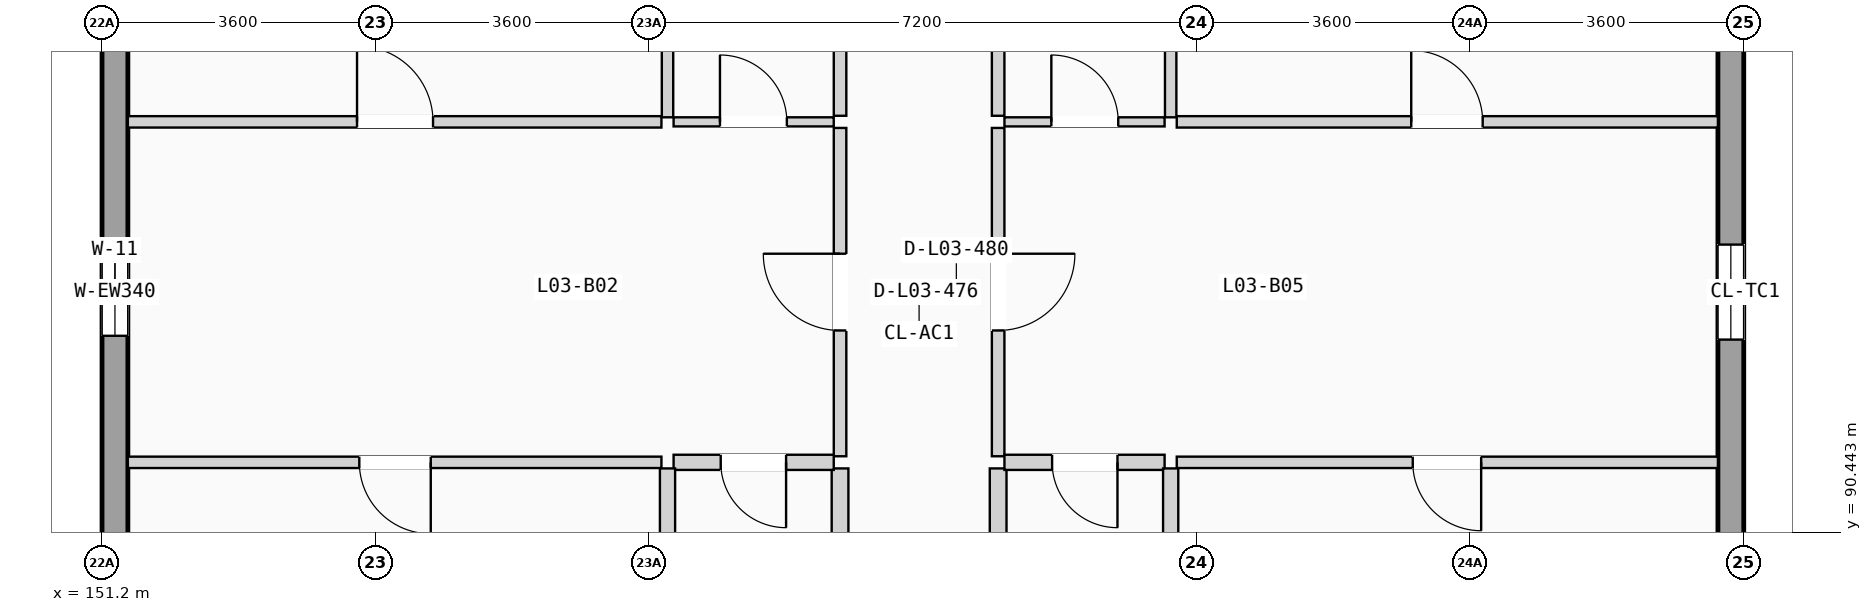
"""IFC4 building model, lengths in metres.
Left out: names, types, materials, properties, quantities, classifications, styles, units other than length and angle.
Written with IfcOpenShell. Run it as: python <this file> out.ifc"""

import sys

from ifc_helpers import new_model, si_unit, direction, frame, frame_2d, origin, place, context, subcontext, project, spatial, rectangle, extrude, element, fill, save


model = new_model("IFC4")
c1 = context("Model", 3, precision=1e-05, world=origin(), true_north=direction((0.0, 1.0)))
c2 = subcontext(c1, "Body", "Model", "MODEL_VIEW")
j1 = project(units=[si_unit("LENGTHUNIT", "METRE"), si_unit("PLANEANGLEUNIT", "RADIAN")], contexts=[c1])
p1 = place(None, origin())
s1 = spatial("IfcSite", under=j1, at=p1, CompositionType="ELEMENT")
p2 = place(p1, origin())
s2 = spatial("IfcBuilding", under=s1, at=p2, CompositionType="ELEMENT")
p3 = place(p2, frame((0.0, 0.0, 12.075)))
s3 = spatial("IfcBuildingStorey", under=s2, at=p3, CompositionType="ELEMENT", Elevation=12.075)
p4 = place(p3, frame((151.37, 68.74, 0.0), z_axis=(0.0, 0.0, 1.0), x_axis=(0.0, 1.0, 0.0)))
e1 = element("IfcWall", 1, at=p4, inside=s3, PredefinedType="SOLIDWALL", context=c2, shape_type="SweptSolid", body=[
    extrude(rectangle(XDim=49.72, YDim=0.34, at=frame_2d((24.86, 0.0))), origin(), (0.0, 0.0, 1.0), 2.89),
])
p5 = place(p4, frame((11.462, 0.0, 0.0)))
e2 = element("IfcOpeningElement", 2, at=p5, cuts=e1, PredefinedType="OPENING", context=c2, shape_type="SweptSolid", body=[
    extrude(rectangle(XDim=0.95, YDim=2.15, at=frame_2d((0.475, 1.075))), frame((0.0, 0.18, 0.0), z_axis=(0.0, -1.0, 0.0), x_axis=(1.0, 0.0, 0.0)), (0.0, 0.0, 1.0), 0.36),
])
p6 = place(p4, frame((8.481, 0.0, 0.555)))
e3 = element("IfcOpeningElement", 3, at=p6, cuts=e1, PredefinedType="OPENING", context=c2, shape_type="SweptSolid", body=[
    extrude(rectangle(XDim=1.05, YDim=1.65, at=frame_2d((0.525, 0.825))), frame((0.0, 0.18, 0.0), z_axis=(0.0, -1.0, 0.0), x_axis=(1.0, 0.0, 0.0)), (0.0, 0.0, 1.0), 0.36),
])
p7 = place(p4, frame((16.565, 0.0, 0.85)))
e4 = element("IfcOpeningElement", 4, at=p7, cuts=e1, PredefinedType="OPENING", context=c2, shape_type="SweptSolid", body=[
    extrude(rectangle(XDim=0.95, YDim=1.2, at=frame_2d((0.475, 0.6))), frame((0.0, 0.18, 0.0), z_axis=(0.0, -1.0, 0.0), x_axis=(1.0, 0.0, 0.0)), (0.0, 0.0, 1.0), 0.36),
])
p8 = place(p4, frame((24.285, 0.0, 0.9)))
e5 = element("IfcOpeningElement", 5, at=p8, cuts=e1, PredefinedType="OPENING", context=c2, shape_type="SweptSolid", body=[
    extrude(rectangle(XDim=1.15, YDim=1.2, at=frame_2d((0.575, 0.6))), frame((0.0, 0.18, 0.0), z_axis=(0.0, -1.0, 0.0), x_axis=(1.0, 0.0, 0.0)), (0.0, 0.0, 1.0), 0.36),
])
p9 = place(p4, frame((19.403, 0.0, 0.855)))
e6 = element("IfcOpeningElement", 6, at=p9, cuts=e1, PredefinedType="OPENING", context=c2, shape_type="SweptSolid", body=[
    extrude(rectangle(XDim=1.15, YDim=1.35, at=frame_2d((0.575, 0.675))), frame((0.0, 0.18, 0.0), z_axis=(0.0, -1.0, 0.0), x_axis=(1.0, 0.0, 0.0)), (0.0, 0.0, 1.0), 0.36),
])
p10 = place(p4, frame((29.167, 0.0, 0.705)))
e7 = element("IfcOpeningElement", 7, at=p10, cuts=e1, PredefinedType="OPENING", context=c2, shape_type="SweptSolid", body=[
    extrude(rectangle(XDim=1.15, YDim=1.5, at=frame_2d((0.575, 0.75))), frame((0.0, 0.18, 0.0), z_axis=(0.0, -1.0, 0.0), x_axis=(1.0, 0.0, 0.0)), (0.0, 0.0, 1.0), 0.36),
])
p11 = place(p4, frame((37.243, 0.0, 0.0)))
e8 = element("IfcOpeningElement", 8, at=p11, cuts=e1, PredefinedType="OPENING", context=c2, shape_type="SweptSolid", body=[
    extrude(rectangle(XDim=1.08, YDim=2.18, at=frame_2d((0.54, 1.09))), frame((0.0, 0.18, 0.0), z_axis=(0.0, -1.0, 0.0), x_axis=(1.0, 0.0, 0.0)), (0.0, 0.0, 1.0), 0.36),
])
p12 = place(p4, frame((32.106, 0.0, 0.555)))
e9 = element("IfcOpeningElement", 9, at=p12, cuts=e1, PredefinedType="OPENING", context=c2, shape_type="SweptSolid", body=[
    extrude(rectangle(XDim=1.15, YDim=1.65, at=frame_2d((0.575, 0.825))), frame((0.0, 0.18, 0.0), z_axis=(0.0, -1.0, 0.0), x_axis=(1.0, 0.0, 0.0)), (0.0, 0.0, 1.0), 0.36),
])
p13 = place(p4, frame((40.239, 0.0, 0.85)))
e10 = element("IfcOpeningElement", 10, at=p13, cuts=e1, PredefinedType="OPENING", context=c2, shape_type="SweptSolid", body=[
    extrude(rectangle(XDim=0.95, YDim=1.2, at=frame_2d((0.475, 0.6))), frame((0.0, 0.18, 0.0), z_axis=(0.0, -1.0, 0.0), x_axis=(1.0, 0.0, 0.0)), (0.0, 0.0, 1.0), 0.36),
])
p14 = place(p3, frame((172.63, 68.74, 0.0), z_axis=(0.0, 0.0, 1.0), x_axis=(0.0, 1.0, 0.0)))
e11 = element("IfcWall", 11, at=p14, inside=s3, PredefinedType="SOLIDWALL", context=c2, shape_type="SweptSolid", body=[
    extrude(rectangle(XDim=49.72, YDim=0.34, at=frame_2d((24.86, 0.0))), origin(), (0.0, 0.0, 1.0), 2.89),
])
p15 = place(p14, frame((9.472, 0.0, 0.9)))
e12 = element("IfcOpeningElement", 12, at=p15, cuts=e11, PredefinedType="OPENING", context=c2, shape_type="SweptSolid", body=[
    extrude(rectangle(XDim=1.25, YDim=1.2, at=frame_2d((0.625, 0.6))), frame((0.0, 0.18, 0.0), z_axis=(0.0, -1.0, 0.0), x_axis=(1.0, 0.0, 0.0)), (0.0, 0.0, 1.0), 0.36),
])
p16 = place(p14, frame((15.933, 0.0, 0.855)))
e13 = element("IfcOpeningElement", 13, at=p16, cuts=e11, PredefinedType="OPENING", context=c2, shape_type="SweptSolid", body=[
    extrude(rectangle(XDim=1.25, YDim=1.35, at=frame_2d((0.625, 0.675))), frame((0.0, 0.18, 0.0), z_axis=(0.0, -1.0, 0.0), x_axis=(1.0, 0.0, 0.0)), (0.0, 0.0, 1.0), 0.36),
])
p17 = place(p14, frame((24.235, 0.0, 0.705)))
e14 = element("IfcOpeningElement", 14, at=p17, cuts=e11, PredefinedType="OPENING", context=c2, shape_type="SweptSolid", body=[
    extrude(rectangle(XDim=1.25, YDim=1.5, at=frame_2d((0.625, 0.75))), frame((0.0, 0.18, 0.0), z_axis=(0.0, -1.0, 0.0), x_axis=(1.0, 0.0, 0.0)), (0.0, 0.0, 1.0), 0.36),
])
p18 = place(p14, frame((19.353, 0.0, 0.555)))
e15 = element("IfcOpeningElement", 15, at=p18, cuts=e11, PredefinedType="OPENING", context=c2, shape_type="SweptSolid", body=[
    extrude(rectangle(XDim=1.25, YDim=1.65, at=frame_2d((0.625, 0.825))), frame((0.0, 0.18, 0.0), z_axis=(0.0, -1.0, 0.0), x_axis=(1.0, 0.0, 0.0)), (0.0, 0.0, 1.0), 0.36),
])
p19 = place(p14, frame((29.267, 0.0, 0.85)))
e16 = element("IfcOpeningElement", 16, at=p19, cuts=e11, PredefinedType="OPENING", context=c2, shape_type="SweptSolid", body=[
    extrude(rectangle(XDim=0.95, YDim=1.2, at=frame_2d((0.475, 0.6))), frame((0.0, 0.18, 0.0), z_axis=(0.0, -1.0, 0.0), x_axis=(1.0, 0.0, 0.0)), (0.0, 0.0, 1.0), 0.36),
])
p20 = place(p14, frame((36.694, 0.0, 0.9)))
e17 = element("IfcOpeningElement", 17, at=p20, cuts=e11, PredefinedType="OPENING", context=c2, shape_type="SweptSolid", body=[
    extrude(rectangle(XDim=1.35, YDim=1.2, at=frame_2d((0.675, 0.6))), frame((0.0, 0.18, 0.0), z_axis=(0.0, -1.0, 0.0), x_axis=(1.0, 0.0, 0.0)), (0.0, 0.0, 1.0), 0.36),
])
p21 = place(p14, frame((32.006, 0.0, 0.855)))
e18 = element("IfcOpeningElement", 18, at=p21, cuts=e11, PredefinedType="OPENING", context=c2, shape_type="SweptSolid", body=[
    extrude(rectangle(XDim=1.35, YDim=1.35, at=frame_2d((0.675, 0.675))), frame((0.0, 0.18, 0.0), z_axis=(0.0, -1.0, 0.0), x_axis=(1.0, 0.0, 0.0)), (0.0, 0.0, 1.0), 0.36),
])
p22 = place(p14, frame((40.038, 0.0, 0.705)))
e19 = element("IfcOpeningElement", 19, at=p22, cuts=e11, PredefinedType="OPENING", context=c2, shape_type="SweptSolid", body=[
    extrude(rectangle(XDim=1.35, YDim=1.5, at=frame_2d((0.675, 0.75))), frame((0.0, 0.18, 0.0), z_axis=(0.0, -1.0, 0.0), x_axis=(1.0, 0.0, 0.0)), (0.0, 0.0, 1.0), 0.36),
])
p23 = place(p3, frame((160.91, 91.44, 0.0), z_axis=(0.0, 0.0, 1.0), x_axis=(0.0, 1.0, 0.0)))
e20 = element("IfcWall", 20, at=p23, inside=s3, PredefinedType="PARTITIONING", context=c2, shape_type="SweptSolid", body=[
    extrude(rectangle(XDim=4.32, YDim=0.165, at=frame_2d((2.16, 0.0))), origin(), (0.0, 0.0, 1.0), 2.87),
])
p24 = place(p23, frame((1.655, 0.0, 0.0)))
e21 = element("IfcOpeningElement", 21, at=p24, cuts=e20, PredefinedType="OPENING", context=c2, shape_type="SweptSolid", body=[
    extrude(rectangle(XDim=1.01, YDim=2.11, at=frame_2d((0.505, 1.055))), frame((0.0, 0.093, 0.0), z_axis=(0.0, -1.0, 0.0), x_axis=(1.0, 0.0, 0.0)), (0.0, 0.0, 1.0), 0.185),
])
p25 = place(p3, frame((160.91, 87.706, 0.0), z_axis=(0.0, 0.0, 1.0), x_axis=(0.0, 1.0, 0.0)))
e22 = element("IfcWall", 22, at=p25, inside=s3, PredefinedType="PLUMBINGWALL", context=c2, shape_type="SweptSolid", body=[
    extrude(rectangle(XDim=3.574, YDim=0.22, at=frame_2d((1.787, 0.0))), origin(), (0.0, 0.0, 1.0), 2.87),
])
p26 = place(p3, frame((160.91, 95.92, 0.0), z_axis=(0.0, 0.0, 1.0), x_axis=(0.0, 1.0, 0.0)))
e23 = element("IfcWall", 23, at=p26, inside=s3, PredefinedType="PARTITIONING", context=c2, shape_type="SweptSolid", body=[
    extrude(rectangle(XDim=3.574, YDim=0.165, at=frame_2d((1.787, 0.0))), origin(), (0.0, 0.0, 1.0), 2.87),
])
p27 = place(p3, frame((162.99, 91.44, 0.0), z_axis=(0.0, 0.0, 1.0), x_axis=(0.0, 1.0, 0.0)))
e24 = element("IfcWall", 24, at=p27, inside=s3, PredefinedType="PARTITIONING", context=c2, shape_type="SweptSolid", body=[
    extrude(rectangle(XDim=4.32, YDim=0.165, at=frame_2d((2.16, 0.0))), origin(), (0.0, 0.0, 1.0), 2.87),
])
p28 = place(p27, frame((1.655, 0.0, 0.0)))
e25 = element("IfcOpeningElement", 25, at=p28, cuts=e24, PredefinedType="OPENING", context=c2, shape_type="SweptSolid", body=[
    extrude(rectangle(XDim=1.01, YDim=2.11, at=frame_2d((0.505, 1.055))), frame((0.0, 0.093, 0.0), z_axis=(0.0, -1.0, 0.0), x_axis=(1.0, 0.0, 0.0)), (0.0, 0.0, 1.0), 0.185),
])
p29 = place(p3, frame((162.99, 87.706, 0.0), z_axis=(0.0, 0.0, 1.0), x_axis=(0.0, 1.0, 0.0)))
e26 = element("IfcWall", 26, at=p29, inside=s3, PredefinedType="PLUMBINGWALL", context=c2, shape_type="SweptSolid", body=[
    extrude(rectangle(XDim=3.574, YDim=0.22, at=frame_2d((1.787, 0.0))), origin(), (0.0, 0.0, 1.0), 2.87),
])
p30 = place(p3, frame((162.99, 95.92, 0.0), z_axis=(0.0, 0.0, 1.0), x_axis=(0.0, 1.0, 0.0)))
e27 = element("IfcWall", 27, at=p30, inside=s3, PredefinedType="PARTITIONING", context=c2, shape_type="SweptSolid", body=[
    extrude(rectangle(XDim=3.574, YDim=0.165, at=frame_2d((1.787, 0.0))), origin(), (0.0, 0.0, 1.0), 2.87),
])
p31 = place(p3, frame((158.72, 91.36, 0.0), z_axis=(0.0, 0.0, 1.0), x_axis=(1.0, 0.0, 0.0)))
e28 = element("IfcWall", 28, at=p31, inside=s3, PredefinedType="PLUMBINGWALL", context=c2, shape_type="SweptSolid", body=[
    extrude(rectangle(XDim=2.107, YDim=0.2, at=frame_2d((1.053, 0.0))), origin(), (0.0, 0.0, 1.0), 2.87),
])
p32 = place(p31, frame((0.62, 0.0, 0.0)))
e29 = element("IfcOpeningElement", 29, at=p32, cuts=e28, PredefinedType="OPENING", context=c2, shape_type="SweptSolid", body=[
    extrude(rectangle(XDim=0.86, YDim=2.0, at=frame_2d((0.43, 1.0))), frame((0.0, 0.11, 0.0), z_axis=(0.0, -1.0, 0.0), x_axis=(1.0, 0.0, 0.0)), (0.0, 0.0, 1.0), 0.22),
])
p33 = place(p3, frame((158.72, 95.84, 0.0), z_axis=(0.0, 0.0, 1.0), x_axis=(1.0, 0.0, 0.0)))
e30 = element("IfcWall", 30, at=p33, inside=s3, PredefinedType="PARTITIONING", context=c2, shape_type="SweptSolid", body=[
    extrude(rectangle(XDim=2.107, YDim=0.12, at=frame_2d((1.053, 0.0))), origin(), (0.0, 0.0, 1.0), 2.87),
])
p34 = place(p33, frame((0.61, 0.0, 0.0)))
e31 = element("IfcOpeningElement", 31, at=p34, cuts=e30, PredefinedType="OPENING", context=c2, shape_type="SweptSolid", body=[
    extrude(rectangle(XDim=0.88, YDim=2.02, at=frame_2d((0.44, 1.01))), frame((0.0, 0.07, 0.0), z_axis=(0.0, -1.0, 0.0), x_axis=(1.0, 0.0, 0.0)), (0.0, 0.0, 1.0), 0.14),
])
p35 = place(p3, frame((151.54, 91.36, 0.0), z_axis=(0.0, 0.0, 1.0), x_axis=(1.0, 0.0, 0.0)))
e32 = element("IfcWall", 32, at=p35, inside=s3, PredefinedType="PARTITIONING", context=c2, shape_type="SweptSolid", body=[
    extrude(rectangle(XDim=7.02, YDim=0.15, at=frame_2d((3.51, 0.0))), origin(), (0.0, 0.0, 1.0), 2.87),
])
p36 = place(p35, frame((3.045, 0.0, 0.0)))
e33 = element("IfcOpeningElement", 33, at=p36, cuts=e32, PredefinedType="OPENING", context=c2, shape_type="SweptSolid", body=[
    extrude(rectangle(XDim=0.94, YDim=2.06, at=frame_2d((0.47, 1.03))), frame((0.0, 0.085, 0.0), z_axis=(0.0, -1.0, 0.0), x_axis=(1.0, 0.0, 0.0)), (0.0, 0.0, 1.0), 0.17),
])
p37 = place(p3, frame((151.54, 95.84, 0.0), z_axis=(0.0, 0.0, 1.0), x_axis=(1.0, 0.0, 0.0)))
e34 = element("IfcWall", 34, at=p37, inside=s3, PredefinedType="PARTITIONING", context=c2, shape_type="SweptSolid", body=[
    extrude(rectangle(XDim=7.02, YDim=0.15, at=frame_2d((3.51, 0.0))), origin(), (0.0, 0.0, 1.0), 2.87),
])
p38 = place(p37, frame((3.015, 0.0, 0.0)))
e35 = element("IfcOpeningElement", 35, at=p38, cuts=e34, PredefinedType="OPENING", context=c2, shape_type="SweptSolid", body=[
    extrude(rectangle(XDim=1.0, YDim=2.06, at=frame_2d((0.5, 1.03))), frame((0.0, 0.085, 0.0), z_axis=(0.0, -1.0, 0.0), x_axis=(1.0, 0.0, 0.0)), (0.0, 0.0, 1.0), 0.17),
])
p39 = place(p3, frame((158.64, 87.706, 0.0), z_axis=(0.0, 0.0, 1.0), x_axis=(0.0, 1.0, 0.0)))
e36 = element("IfcWall", 36, at=p39, inside=s3, PredefinedType="PLUMBINGWALL", context=c2, shape_type="SweptSolid", body=[
    extrude(rectangle(XDim=3.574, YDim=0.2, at=frame_2d((1.787, 0.0))), origin(), (0.0, 0.0, 1.0), 2.87),
])
p40 = place(p3, frame((158.64, 95.9, 0.0), z_axis=(0.0, 0.0, 1.0), x_axis=(0.0, 1.0, 0.0)))
e37 = element("IfcWall", 37, at=p40, inside=s3, PredefinedType="PARTITIONING", context=c2, shape_type="SweptSolid", body=[
    extrude(rectangle(XDim=3.594, YDim=0.15, at=frame_2d((1.797, 0.0))), origin(), (0.0, 0.0, 1.0), 2.87),
])
p41 = place(p3, frame((163.073, 91.36, 0.0), z_axis=(0.0, 0.0, 1.0), x_axis=(1.0, 0.0, 0.0)))
e38 = element("IfcWall", 38, at=p41, inside=s3, PredefinedType="PLUMBINGWALL", context=c2, shape_type="SweptSolid", body=[
    extrude(rectangle(XDim=2.107, YDim=0.2, at=frame_2d((1.053, 0.0))), origin(), (0.0, 0.0, 1.0), 2.87),
])
p42 = place(p41, frame((0.627, 0.0, 0.0)))
e39 = element("IfcOpeningElement", 39, at=p42, cuts=e38, PredefinedType="OPENING", context=c2, shape_type="SweptSolid", body=[
    extrude(rectangle(XDim=0.86, YDim=2.0, at=frame_2d((0.43, 1.0))), frame((0.0, 0.11, 0.0), z_axis=(0.0, -1.0, 0.0), x_axis=(1.0, 0.0, 0.0)), (0.0, 0.0, 1.0), 0.22),
])
p43 = place(p3, frame((163.073, 95.84, 0.0), z_axis=(0.0, 0.0, 1.0), x_axis=(1.0, 0.0, 0.0)))
e40 = element("IfcWall", 40, at=p43, inside=s3, PredefinedType="PARTITIONING", context=c2, shape_type="SweptSolid", body=[
    extrude(rectangle(XDim=2.107, YDim=0.12, at=frame_2d((1.053, 0.0))), origin(), (0.0, 0.0, 1.0), 2.87),
])
p44 = place(p43, frame((0.617, 0.0, 0.0)))
e41 = element("IfcOpeningElement", 41, at=p44, cuts=e40, PredefinedType="OPENING", context=c2, shape_type="SweptSolid", body=[
    extrude(rectangle(XDim=0.88, YDim=2.02, at=frame_2d((0.44, 1.01))), frame((0.0, 0.07, 0.0), z_axis=(0.0, -1.0, 0.0), x_axis=(1.0, 0.0, 0.0)), (0.0, 0.0, 1.0), 0.14),
])
p45 = place(p3, frame((165.34, 91.36, 0.0), z_axis=(0.0, 0.0, 1.0), x_axis=(1.0, 0.0, 0.0)))
e42 = element("IfcWall", 42, at=p45, inside=s3, PredefinedType="PARTITIONING", context=c2, shape_type="SweptSolid", body=[
    extrude(rectangle(XDim=7.12, YDim=0.15, at=frame_2d((3.56, 0.0))), origin(), (0.0, 0.0, 1.0), 2.87),
])
p46 = place(p45, frame((3.105, 0.0, 0.0)))
e43 = element("IfcOpeningElement", 43, at=p46, cuts=e42, PredefinedType="OPENING", context=c2, shape_type="SweptSolid", body=[
    extrude(rectangle(XDim=0.9, YDim=2.04, at=frame_2d((0.45, 1.02))), frame((0.0, 0.085, 0.0), z_axis=(0.0, -1.0, 0.0), x_axis=(1.0, 0.0, 0.0)), (0.0, 0.0, 1.0), 0.17),
])
p47 = place(p3, frame((165.34, 95.84, 0.0), z_axis=(0.0, 0.0, 1.0), x_axis=(1.0, 0.0, 0.0)))
e44 = element("IfcWall", 44, at=p47, inside=s3, PredefinedType="PARTITIONING", context=c2, shape_type="SweptSolid", body=[
    extrude(rectangle(XDim=7.12, YDim=0.15, at=frame_2d((3.56, 0.0))), origin(), (0.0, 0.0, 1.0), 2.87),
])
p48 = place(p47, frame((3.085, 0.0, 0.0)))
e45 = element("IfcOpeningElement", 45, at=p48, cuts=e44, PredefinedType="OPENING", context=c2, shape_type="SweptSolid", body=[
    extrude(rectangle(XDim=0.94, YDim=2.06, at=frame_2d((0.47, 1.03))), frame((0.0, 0.085, 0.0), z_axis=(0.0, -1.0, 0.0), x_axis=(1.0, 0.0, 0.0)), (0.0, 0.0, 1.0), 0.17),
])
p49 = place(p3, frame((165.26, 87.706, 0.0), z_axis=(0.0, 0.0, 1.0), x_axis=(0.0, 1.0, 0.0)))
e46 = element("IfcWall", 46, at=p49, inside=s3, PredefinedType="PLUMBINGWALL", context=c2, shape_type="SweptSolid", body=[
    extrude(rectangle(XDim=3.574, YDim=0.2, at=frame_2d((1.787, 0.0))), origin(), (0.0, 0.0, 1.0), 2.87),
])
p50 = place(p3, frame((165.26, 95.9, 0.0), z_axis=(0.0, 0.0, 1.0), x_axis=(0.0, 1.0, 0.0)))
e47 = element("IfcWall", 47, at=p50, inside=s3, PredefinedType="PARTITIONING", context=c2, shape_type="SweptSolid", body=[
    extrude(rectangle(XDim=3.594, YDim=0.15, at=frame_2d((1.797, 0.0))), origin(), (0.0, 0.0, 1.0), 2.87),
])
p51 = place(p8, origin())
e48 = element("IfcWindow", 48, at=p51, inside=s3, PartitioningType="SINGLE_PANEL", PredefinedType="WINDOW", context=c2, shape_type="SweptSolid", body=[
    extrude(rectangle(XDim=1.15, YDim=1.2, at=frame_2d((0.575, 0.6))), frame((0.0, 0.03, 0.0), z_axis=(0.0, -1.0, 0.0), x_axis=(1.0, 0.0, 0.0)), (0.0, 0.0, 1.0), 0.06),
])
fill(e5, e48)
p52 = place(p17, origin())
e49 = element("IfcWindow", 49, at=p52, inside=s3, PartitioningType="SINGLE_PANEL", PredefinedType="WINDOW", context=c2, shape_type="SweptSolid", body=[
    extrude(rectangle(XDim=1.25, YDim=1.5, at=frame_2d((0.625, 0.75))), frame((0.0, 0.03, 0.0), z_axis=(0.0, -1.0, 0.0), x_axis=(1.0, 0.0, 0.0)), (0.0, 0.0, 1.0), 0.06),
])
fill(e14, e49)
p53 = place(p24, origin())
e50 = element("IfcDoor", 50, at=p53, inside=s3, OperationType="SINGLE_SWING_RIGHT", PredefinedType="DOOR", context=c2, shape_type="SweptSolid", body=[
    extrude(rectangle(XDim=1.01, YDim=2.11, at=frame_2d((0.505, 1.055))), frame((0.0, 0.025, 0.0), z_axis=(0.0, -1.0, 0.0), x_axis=(1.0, 0.0, 0.0)), (0.0, 0.0, 1.0), 0.05),
])
fill(e21, e50)
p54 = place(p28, frame((1.01, 0.0, 0.0), z_axis=(0.0, 0.0, 1.0), x_axis=(-1.0, 0.0, 0.0)))
e51 = element("IfcDoor", 51, at=p54, inside=s3, OperationType="SINGLE_SWING_RIGHT", PredefinedType="DOOR", context=c2, shape_type="SweptSolid", body=[
    extrude(rectangle(XDim=1.01, YDim=2.11, at=frame_2d((0.505, 1.055))), frame((0.0, 0.025, 0.0), z_axis=(0.0, -1.0, 0.0), x_axis=(1.0, 0.0, 0.0)), (0.0, 0.0, 1.0), 0.05),
])
fill(e25, e51)
p55 = place(p32, frame((0.86, 0.0, 0.0), z_axis=(0.0, 0.0, 1.0), x_axis=(-1.0, 0.0, 0.0)))
e52 = element("IfcDoor", 52, at=p55, inside=s3, OperationType="SINGLE_SWING_RIGHT", PredefinedType="DOOR", context=c2, shape_type="SweptSolid", body=[
    extrude(rectangle(XDim=0.86, YDim=2.0, at=frame_2d((0.43, 1.0))), frame((0.0, 0.025, 0.0), z_axis=(0.0, -1.0, 0.0), x_axis=(1.0, 0.0, 0.0)), (0.0, 0.0, 1.0), 0.05),
])
fill(e29, e52)
p56 = place(p34, origin())
e53 = element("IfcDoor", 53, at=p56, inside=s3, OperationType="SINGLE_SWING_LEFT", PredefinedType="DOOR", context=c2, shape_type="SweptSolid", body=[
    extrude(rectangle(XDim=0.88, YDim=2.02, at=frame_2d((0.44, 1.01))), frame((0.0, 0.025, 0.0), z_axis=(0.0, -1.0, 0.0), x_axis=(1.0, 0.0, 0.0)), (0.0, 0.0, 1.0), 0.05),
])
fill(e31, e53)
p57 = place(p36, frame((0.94, 0.0, 0.0), z_axis=(0.0, 0.0, 1.0), x_axis=(-1.0, 0.0, 0.0)))
e54 = element("IfcDoor", 54, at=p57, inside=s3, OperationType="SINGLE_SWING_RIGHT", PredefinedType="DOOR", context=c2, shape_type="SweptSolid", body=[
    extrude(rectangle(XDim=0.94, YDim=2.06, at=frame_2d((0.47, 1.03))), frame((0.0, 0.025, 0.0), z_axis=(0.0, -1.0, 0.0), x_axis=(1.0, 0.0, 0.0)), (0.0, 0.0, 1.0), 0.05),
])
fill(e33, e54)
p58 = place(p38, origin())
e55 = element("IfcDoor", 55, at=p58, inside=s3, OperationType="SINGLE_SWING_LEFT", PredefinedType="DOOR", context=c2, shape_type="SweptSolid", body=[
    extrude(rectangle(XDim=1.0, YDim=2.06, at=frame_2d((0.5, 1.03))), frame((0.0, 0.025, 0.0), z_axis=(0.0, -1.0, 0.0), x_axis=(1.0, 0.0, 0.0)), (0.0, 0.0, 1.0), 0.05),
])
fill(e35, e55)
p59 = place(p42, frame((0.86, 0.0, 0.0), z_axis=(0.0, 0.0, 1.0), x_axis=(-1.0, 0.0, 0.0)))
e56 = element("IfcDoor", 56, at=p59, inside=s3, OperationType="SINGLE_SWING_RIGHT", PredefinedType="DOOR", context=c2, shape_type="SweptSolid", body=[
    extrude(rectangle(XDim=0.86, YDim=2.0, at=frame_2d((0.43, 1.0))), frame((0.0, 0.025, 0.0), z_axis=(0.0, -1.0, 0.0), x_axis=(1.0, 0.0, 0.0)), (0.0, 0.0, 1.0), 0.05),
])
fill(e39, e56)
p60 = place(p44, origin())
e57 = element("IfcDoor", 57, at=p60, inside=s3, OperationType="SINGLE_SWING_LEFT", PredefinedType="DOOR", context=c2, shape_type="SweptSolid", body=[
    extrude(rectangle(XDim=0.88, YDim=2.02, at=frame_2d((0.44, 1.01))), frame((0.0, 0.025, 0.0), z_axis=(0.0, -1.0, 0.0), x_axis=(1.0, 0.0, 0.0)), (0.0, 0.0, 1.0), 0.05),
])
fill(e41, e57)
p61 = place(p46, frame((0.9, 0.0, 0.0), z_axis=(0.0, 0.0, 1.0), x_axis=(-1.0, 0.0, 0.0)))
e58 = element("IfcDoor", 58, at=p61, inside=s3, OperationType="SINGLE_SWING_RIGHT", PredefinedType="DOOR", context=c2, shape_type="SweptSolid", body=[
    extrude(rectangle(XDim=0.9, YDim=2.04, at=frame_2d((0.45, 1.02))), frame((0.0, 0.025, 0.0), z_axis=(0.0, -1.0, 0.0), x_axis=(1.0, 0.0, 0.0)), (0.0, 0.0, 1.0), 0.05),
])
fill(e43, e58)
p62 = place(p48, origin())
e59 = element("IfcDoor", 59, at=p62, inside=s3, OperationType="SINGLE_SWING_LEFT", PredefinedType="DOOR", context=c2, shape_type="SweptSolid", body=[
    extrude(rectangle(XDim=0.94, YDim=2.06, at=frame_2d((0.47, 1.03))), frame((0.0, 0.025, 0.0), z_axis=(0.0, -1.0, 0.0), x_axis=(1.0, 0.0, 0.0)), (0.0, 0.0, 1.0), 0.05),
])
fill(e45, e59)
save(model, sys.argv[1])
